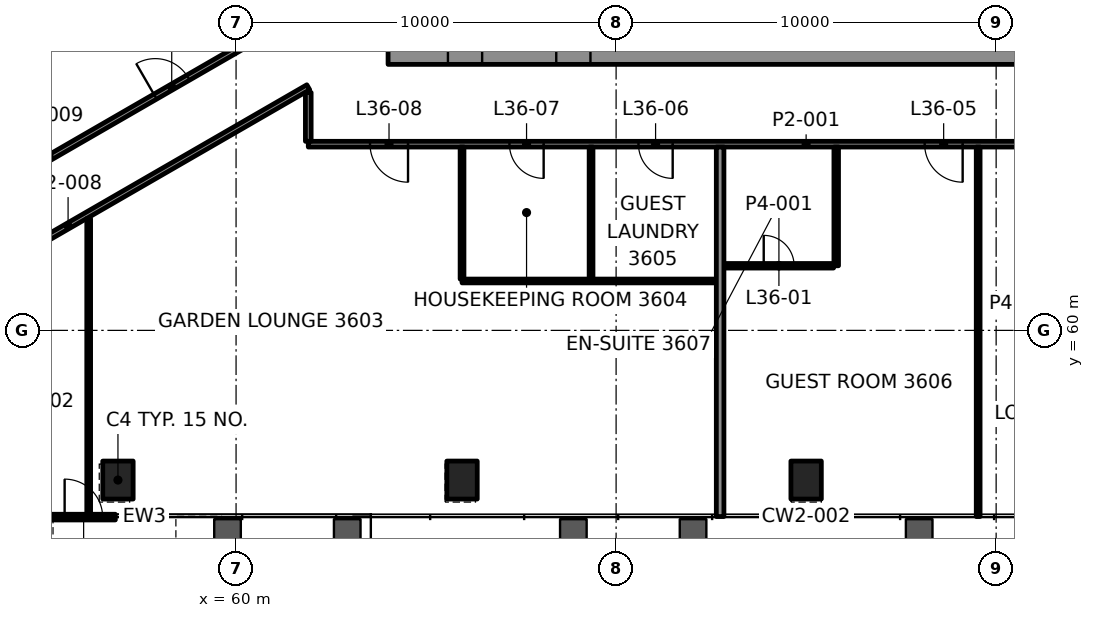
"""IFC4 building model, lengths in metres.
Left out: names, types, materials, properties, quantities, classifications, styles, units other than length and angle.
Written with IfcOpenShell. Run it as: python <this file> out.ifc"""

import sys

from ifc_helpers import new_model, si_unit, direction, frame, frame_2d, origin, origin_2d, place, context, subcontext, project, spatial, rectangle, hollow_rectangle, extrude, element, fill, save


model = new_model("IFC4")
c1 = context("Model", 3, precision=1e-05, world=origin(), true_north=direction((0.0, 1.0)))
c2 = subcontext(c1, "Body", "Model", "MODEL_VIEW")
j1 = project(units=[si_unit("LENGTHUNIT", "METRE"), si_unit("PLANEANGLEUNIT", "RADIAN")], contexts=[c1])
p1 = place(None, origin())
s1 = spatial("IfcSite", under=j1, at=p1, CompositionType="ELEMENT")
p2 = place(p1, origin())
s2 = spatial("IfcBuilding", under=s1, at=p2, CompositionType="ELEMENT")
p3 = place(p2, frame((0.0, 0.0, 159.7)))
s3 = spatial("IfcBuildingStorey", under=s2, at=p3, CompositionType="ELEMENT", Elevation=159.7)
for number, where, z_axis, x_axis in (
    (1, (56.892, 56.061, -0.0), (0.0, 0.0, 1.0), (1.0, 0.0, 0.0)),
    (2, (65.946, 56.061, -0.0), (0.0, 0.0, 1.0), (1.0, 0.0, 0.0)),
    (3, (75.0, 56.061, -0.0), (0.0, 0.0, 1.0), (1.0, 0.0, 0.0)),
):
    element("IfcColumn", number, at=place(p3, frame(where, z_axis=z_axis, x_axis=x_axis)), inside=s3, PredefinedType="COLUMN", context=c2, shape_type="SweptSolid", body=[
        extrude(hollow_rectangle(XDim=0.8, YDim=1.0, WallThickness=0.05, at=origin_2d()), origin(), (0.0, 0.0, 1.0), 3.9),
    ])
p4 = place(p3, frame((64.0, 67.375, 0.0), z_axis=(0.0, 0.0, 1.0), x_axis=(1.0, 0.0, 0.0)))
e4 = element("IfcWall", 4, at=p4, inside=s3, PredefinedType="SHEAR", context=c2, shape_type="SweptSolid", body=[
    extrude(rectangle(XDim=22.0, YDim=0.75, at=frame_2d((11.0, 0.0))), origin(), (0.0, 0.0, 1.0), 3.7),
])
p5 = place(p4, frame((1.575, 0.0, 0.0)))
e5 = element("IfcOpeningElement", 5, at=p5, cuts=e4, PredefinedType="OPENING", context=c2, shape_type="SweptSolid", body=[
    extrude(rectangle(XDim=0.9, YDim=2.1, at=frame_2d((0.45, 1.05))), frame((0.0, 0.385, 0.0), z_axis=(0.0, -1.0, 0.0), x_axis=(1.0, 0.0, 0.0)), (0.0, 0.0, 1.0), 0.77),
])
p6 = place(p4, frame((4.425, 0.0, 0.0)))
e6 = element("IfcOpeningElement", 6, at=p6, cuts=e4, PredefinedType="OPENING", context=c2, shape_type="SweptSolid", body=[
    extrude(rectangle(XDim=0.9, YDim=2.1, at=frame_2d((0.45, 1.05))), frame((0.0, 0.385, 0.0), z_axis=(0.0, -1.0, 0.0), x_axis=(1.0, 0.0, 0.0)), (0.0, 0.0, 1.0), 0.77),
])
p7 = place(p3, frame((65.946, 61.3, 0.0), z_axis=(0.0, 0.0, 1.0), x_axis=(1.0, 0.0, 0.0)))
e7 = element("IfcWall", 7, at=p7, inside=s3, PredefinedType="PARTITIONING", context=c2, shape_type="SweptSolid", body=[
    extrude(rectangle(XDim=6.69, YDim=0.1, at=frame_2d((3.345, 0.0))), origin(), (0.0, 0.0, 1.0), 3.1),
])
p8 = place(p3, frame((72.846, 61.7, 0.0), z_axis=(0.0, 0.0, 1.0), x_axis=(1.0, 0.0, 0.0)))
e8 = element("IfcWall", 8, at=p8, inside=s3, PredefinedType="PARTITIONING", context=c2, shape_type="SweptSolid", body=[
    extrude(rectangle(XDim=2.876, YDim=0.12, at=frame_2d((1.438, 0.0))), origin(), (0.0, 0.0, 1.0), 3.1),
])
p9 = place(p8, frame((1.038, 0.0, 0.0)))
e9 = element("IfcOpeningElement", 9, at=p9, cuts=e8, PredefinedType="OPENING", context=c2, shape_type="SweptSolid", body=[
    extrude(rectangle(XDim=0.8, YDim=2.1, at=frame_2d((0.4, 1.05))), frame((0.0, 0.07, 0.0), z_axis=(0.0, -1.0, 0.0), x_axis=(1.0, 0.0, 0.0)), (0.0, 0.0, 1.0), 0.14),
])
p10 = place(p3, frame((88.1, 64.9, 0.0), z_axis=(0.0, 0.0, 1.0), x_axis=(-1.0, 0.0, 0.0)))
e10 = element("IfcWall", 10, at=p10, inside=s3, PredefinedType="PARTITIONING", context=c2, shape_type="SweptSolid", body=[
    extrude(rectangle(XDim=26.199, YDim=0.15, at=frame_2d((13.1, 0.0))), origin(), (0.0, 0.0, 1.0), 3.1),
])
p11 = place(p10, frame((0.322, 0.0, 0.0)))
e11 = element("IfcOpeningElement", 11, at=p11, cuts=e10, PredefinedType="OPENING", context=c2, shape_type="SweptSolid", body=[
    extrude(rectangle(XDim=1.0, YDim=2.1, at=frame_2d((0.5, 1.05))), frame((0.0, 0.085, 0.0), z_axis=(0.0, -1.0, 0.0), x_axis=(1.0, 0.0, 0.0)), (0.0, 0.0, 1.0), 0.17),
])
p12 = place(p10, frame((5.859, 0.0, 0.0)))
e12 = element("IfcOpeningElement", 12, at=p12, cuts=e10, PredefinedType="OPENING", context=c2, shape_type="SweptSolid", body=[
    extrude(rectangle(XDim=0.9, YDim=2.1, at=frame_2d((0.45, 1.05))), frame((0.0, 0.085, 0.0), z_axis=(0.0, -1.0, 0.0), x_axis=(1.0, 0.0, 0.0)), (0.0, 0.0, 1.0), 0.17),
])
p13 = place(p10, frame((8.981, 0.0, 0.0)))
e13 = element("IfcOpeningElement", 13, at=p13, cuts=e10, PredefinedType="OPENING", context=c2, shape_type="SweptSolid", body=[
    extrude(rectangle(XDim=1.0, YDim=2.1, at=frame_2d((0.5, 1.05))), frame((0.0, 0.085, 0.0), z_axis=(0.0, -1.0, 0.0), x_axis=(1.0, 0.0, 0.0)), (0.0, 0.0, 1.0), 0.17),
])
p14 = place(p10, frame((16.611, 0.0, 0.0)))
e14 = element("IfcOpeningElement", 14, at=p14, cuts=e10, PredefinedType="OPENING", context=c2, shape_type="SweptSolid", body=[
    extrude(rectangle(XDim=0.9, YDim=2.1, at=frame_2d((0.45, 1.05))), frame((0.0, 0.085, 0.0), z_axis=(0.0, -1.0, 0.0), x_axis=(1.0, 0.0, 0.0)), (0.0, 0.0, 1.0), 0.17),
])
p15 = place(p10, frame((20.006, 0.0, 0.0)))
e15 = element("IfcOpeningElement", 15, at=p15, cuts=e10, PredefinedType="OPENING", context=c2, shape_type="SweptSolid", body=[
    extrude(rectangle(XDim=0.9, YDim=2.1, at=frame_2d((0.45, 1.05))), frame((0.0, 0.085, 0.0), z_axis=(0.0, -1.0, 0.0), x_axis=(1.0, 0.0, 0.0)), (0.0, 0.0, 1.0), 0.17),
])
p16 = place(p10, frame((23.575, 0.0, 0.0)))
e16 = element("IfcOpeningElement", 16, at=p16, cuts=e10, PredefinedType="OPENING", context=c2, shape_type="SweptSolid", body=[
    extrude(rectangle(XDim=1.0, YDim=2.1, at=frame_2d((0.5, 1.05))), frame((0.0, 0.085, 0.0), z_axis=(0.0, -1.0, 0.0), x_axis=(1.0, 0.0, 0.0)), (0.0, 0.0, 1.0), 0.17),
])
p17 = place(p3, frame((61.9, 66.397, 0.0), z_axis=(0.0, 0.0, 1.0), x_axis=(-0.86603071172, -0.499990806274, 0.0)))
e17 = element("IfcWall", 17, at=p17, inside=s3, PredefinedType="PARTITIONING", context=c2, shape_type="SweptSolid", body=[
    extrude(rectangle(XDim=14.595, YDim=0.15, at=frame_2d((7.298, 0.0))), origin(), (0.0, 0.0, 1.0), 2.947),
])
p18 = place(p17, frame((10.032, 0.0, 0.0)))
e18 = element("IfcOpeningElement", 18, at=p18, cuts=e17, PredefinedType="OPENING", context=c2, shape_type="SweptSolid", body=[
    extrude(rectangle(XDim=1.0, YDim=2.1, at=frame_2d((0.5, 1.05))), frame((0.0, 0.085, 0.0), z_axis=(0.0, -1.0, 0.0), x_axis=(1.0, 0.0, 0.0)), (0.0, 0.0, 1.0), 0.17),
])
p19 = place(p3, frame((48.36, 60.659, 0.0), z_axis=(0.0, 0.0, 1.0), x_axis=(0.866033404619, 0.499986141892, 0.0)))
e19 = element("IfcWall", 19, at=p19, inside=s3, PredefinedType="PARTITIONING", context=c2, shape_type="SweptSolid", body=[
    extrude(rectangle(XDim=15.548, YDim=0.15, at=frame_2d((7.774, 0.0))), origin(), (0.0, 0.0, 1.0), 3.1),
])
p20 = place(p19, frame((3.415, 0.0, 0.0)))
e20 = element("IfcOpeningElement", 20, at=p20, cuts=e19, PredefinedType="OPENING", context=c2, shape_type="SweptSolid", body=[
    extrude(rectangle(XDim=1.0, YDim=2.1, at=frame_2d((0.5, 1.05))), frame((0.0, 0.085, 0.0), z_axis=(0.0, -1.0, 0.0), x_axis=(1.0, 0.0, 0.0)), (0.0, 0.0, 1.0), 0.17),
])
p21 = place(p19, frame((10.986, 0.0, 0.0)))
e21 = element("IfcOpeningElement", 21, at=p21, cuts=e19, PredefinedType="OPENING", context=c2, shape_type="SweptSolid", body=[
    extrude(rectangle(XDim=1.0, YDim=2.1, at=frame_2d((0.5, 1.05))), frame((0.0, 0.085, 0.0), z_axis=(0.0, -1.0, 0.0), x_axis=(1.0, 0.0, 0.0)), (0.0, 0.0, 1.0), 0.17),
])
p22 = place(p3, frame((79.527, 55.101, 0.0), z_axis=(0.0, 0.0, 1.0), x_axis=(0.0, 1.0, 0.0)))
e22 = element("IfcWall", 22, at=p22, inside=s3, PredefinedType="PARTITIONING", context=c2, shape_type="SweptSolid", body=[
    extrude(rectangle(XDim=9.724, YDim=0.1, at=frame_2d((4.862, 0.0))), origin(), (0.0, 0.0, 1.0), 2.865),
])
p23 = place(p3, frame((75.792, 61.7, 0.0), z_axis=(0.0, 0.0, 1.0), x_axis=(0.0, 1.0, 0.0)))
e23 = element("IfcWall", 23, at=p23, inside=s3, PredefinedType="PARTITIONING", context=c2, shape_type="SweptSolid", body=[
    extrude(rectangle(XDim=3.125, YDim=0.12, at=frame_2d((1.562, 0.0))), origin(), (0.0, 0.0, 1.0), 3.1),
])
p24 = place(p3, frame((72.737, 55.101, 0.0), z_axis=(0.0, 0.0, 1.0), x_axis=(0.0, 1.0, 0.0)))
e24 = element("IfcWall", 24, at=p24, inside=s3, PredefinedType="PARTITIONING", context=c2, shape_type="SweptSolid", body=[
    extrude(rectangle(XDim=9.724, YDim=0.2, at=frame_2d((4.862, 0.0))), origin(), (0.0, 0.0, 1.0), 2.865),
])
for number, where, z_axis, x_axis in (
    (25, (69.341, 61.35, 0.0), (0.0, 0.0, 1.0), (0.0, 1.0, 0.0)),
    (26, (65.946, 61.35, 0.0), (0.0, 0.0, 1.0), (0.0, 1.0, 0.0)),
):
    element("IfcWall", number, at=place(p3, frame(where, z_axis=z_axis, x_axis=x_axis)), inside=s3, PredefinedType="PARTITIONING", context=c2, shape_type="SweptSolid", body=[
        extrude(rectangle(XDim=3.475, YDim=0.1, at=frame_2d((1.737, 0.0))), origin(), (0.0, 0.0, 1.0), 3.1),
    ])
p25 = place(p3, frame((61.9, 64.976, 0.0), z_axis=(0.0, 0.0, 1.0), x_axis=(0.0, 1.0, 0.0)))
e27 = element("IfcWall", 27, at=p25, inside=s3, PredefinedType="PARTITIONING", context=c2, shape_type="SweptSolid", body=[
    extrude(rectangle(XDim=1.285, YDim=0.15, at=frame_2d((0.643, 0.0))), origin(), (0.0, 0.0, 1.0), 2.947),
])
p26 = place(p3, frame((56.122, 55.118, 0.0), z_axis=(0.0, 0.0, 1.0), x_axis=(0.0, 1.0, 0.0)))
e28 = element("IfcWall", 28, at=p26, inside=s3, PredefinedType="PARTITIONING", context=c2, shape_type="SweptSolid", body=[
    extrude(rectangle(XDim=7.827, YDim=0.1, at=frame_2d((3.913, 0.0))), origin(), (0.0, 0.0, 1.0), 3.1),
])
p27 = place(p3, frame((69.117, 111.388, 0.0), z_axis=(0.0, 0.0, 1.0), x_axis=(-0.49999896751, -0.866025999892, 0.0)))
e29 = element("IfcWall", 29, at=p27, inside=s3, PredefinedType="SOLIDWALL", context=c2, shape_type="SweptSolid", body=[
    extrude(rectangle(XDim=57.143, YDim=0.8, at=frame_2d((28.571, 0.0))), origin(), (0.0, 0.0, 1.0), 0.9),
])
p28 = place(p9, origin())
e30 = element("IfcDoor", 30, at=p28, inside=s3, OperationType="SINGLE_SWING_RIGHT", PredefinedType="DOOR", context=c2, shape_type="SweptSolid", body=[
    extrude(rectangle(XDim=0.8, YDim=2.1, at=frame_2d((0.4, 1.05))), frame((0.0, 0.025, 0.0), z_axis=(0.0, -1.0, 0.0), x_axis=(1.0, 0.0, 0.0)), (0.0, 0.0, 1.0), 0.05),
])
fill(e9, e30)
p29 = place(p13, origin())
e31 = element("IfcDoor", 31, at=p29, inside=s3, OperationType="SINGLE_SWING_RIGHT", PredefinedType="DOOR", context=c2, shape_type="SweptSolid", body=[
    extrude(rectangle(XDim=1.0, YDim=2.1, at=frame_2d((0.5, 1.05))), frame((0.0, 0.025, 0.0), z_axis=(0.0, -1.0, 0.0), x_axis=(1.0, 0.0, 0.0)), (0.0, 0.0, 1.0), 0.05),
])
fill(e13, e31)
p30 = place(p14, origin())
e32 = element("IfcDoor", 32, at=p30, inside=s3, OperationType="SINGLE_SWING_LEFT", PredefinedType="DOOR", context=c2, shape_type="SweptSolid", body=[
    extrude(rectangle(XDim=0.9, YDim=2.1, at=frame_2d((0.45, 1.05))), frame((0.0, 0.025, 0.0), z_axis=(0.0, -1.0, 0.0), x_axis=(1.0, 0.0, 0.0)), (0.0, 0.0, 1.0), 0.05),
])
fill(e14, e32)
p31 = place(p15, origin())
e33 = element("IfcDoor", 33, at=p31, inside=s3, OperationType="SINGLE_SWING_RIGHT", PredefinedType="DOOR", context=c2, shape_type="SweptSolid", body=[
    extrude(rectangle(XDim=0.9, YDim=2.1, at=frame_2d((0.45, 1.05))), frame((0.0, 0.025, 0.0), z_axis=(0.0, -1.0, 0.0), x_axis=(1.0, 0.0, 0.0)), (0.0, 0.0, 1.0), 0.05),
])
fill(e15, e33)
p32 = place(p16, origin())
e34 = element("IfcDoor", 34, at=p32, inside=s3, OperationType="SINGLE_SWING_LEFT", PredefinedType="DOOR", context=c2, shape_type="SweptSolid", body=[
    extrude(rectangle(XDim=1.0, YDim=2.1, at=frame_2d((0.5, 1.05))), frame((0.0, 0.025, 0.0), z_axis=(0.0, -1.0, 0.0), x_axis=(1.0, 0.0, 0.0)), (0.0, 0.0, 1.0), 0.05),
])
fill(e16, e34)
p33 = place(p21, origin())
e35 = element("IfcDoor", 35, at=p33, inside=s3, OperationType="SINGLE_SWING_LEFT", PredefinedType="DOOR", context=c2, shape_type="SweptSolid", body=[
    extrude(rectangle(XDim=1.0, YDim=2.1, at=frame_2d((0.5, 1.05))), frame((0.0, 0.025, 0.0), z_axis=(0.0, -1.0, 0.0), x_axis=(1.0, 0.0, 0.0)), (0.0, 0.0, 1.0), 0.05),
])
fill(e21, e35)
p34 = place(p3, frame((55.155, 55.086, 0.0), z_axis=(0.0, 0.0, 1.0), x_axis=(1.0, 0.0, 0.0)))
p35 = place(p34, frame((0.334, 0.0, 0.0)))
p36 = place(p35, origin())
e36 = element("IfcDoor", 36, at=p36, inside=s3, OperationType="SINGLE_SWING_RIGHT", PredefinedType="DOOR", context=c2, shape_type="SweptSolid", body=[
    extrude(rectangle(XDim=1.0, YDim=2.1, at=frame_2d((0.5, 1.05))), frame((0.0, 0.025, 0.0), z_axis=(0.0, -1.0, 0.0), x_axis=(1.0, 0.0, 0.0)), (0.0, 0.0, 1.0), 0.05),
])
p37 = place(p5, origin())
e37 = element("IfcDoor", 37, at=p37, inside=s3, OperationType="SINGLE_SWING_LEFT", PredefinedType="DOOR", context=c2, shape_type="SweptSolid", body=[
    extrude(rectangle(XDim=0.9, YDim=2.1, at=frame_2d((0.45, 1.05))), frame((0.0, 0.095, 0.0), z_axis=(0.0, -1.0, 0.0), x_axis=(1.0, 0.0, 0.0)), (0.0, 0.0, 1.0), 0.19),
])
fill(e5, e37)
p38 = place(p6, origin())
e38 = element("IfcDoor", 38, at=p38, inside=s3, OperationType="SINGLE_SWING_LEFT", PredefinedType="DOOR", context=c2, shape_type="SweptSolid", body=[
    extrude(rectangle(XDim=0.9, YDim=2.1, at=frame_2d((0.45, 1.05))), frame((0.0, 0.095, 0.0), z_axis=(0.0, -1.0, 0.0), x_axis=(1.0, 0.0, 0.0)), (0.0, 0.0, 1.0), 0.19),
])
fill(e6, e38)
save(model, sys.argv[1])
